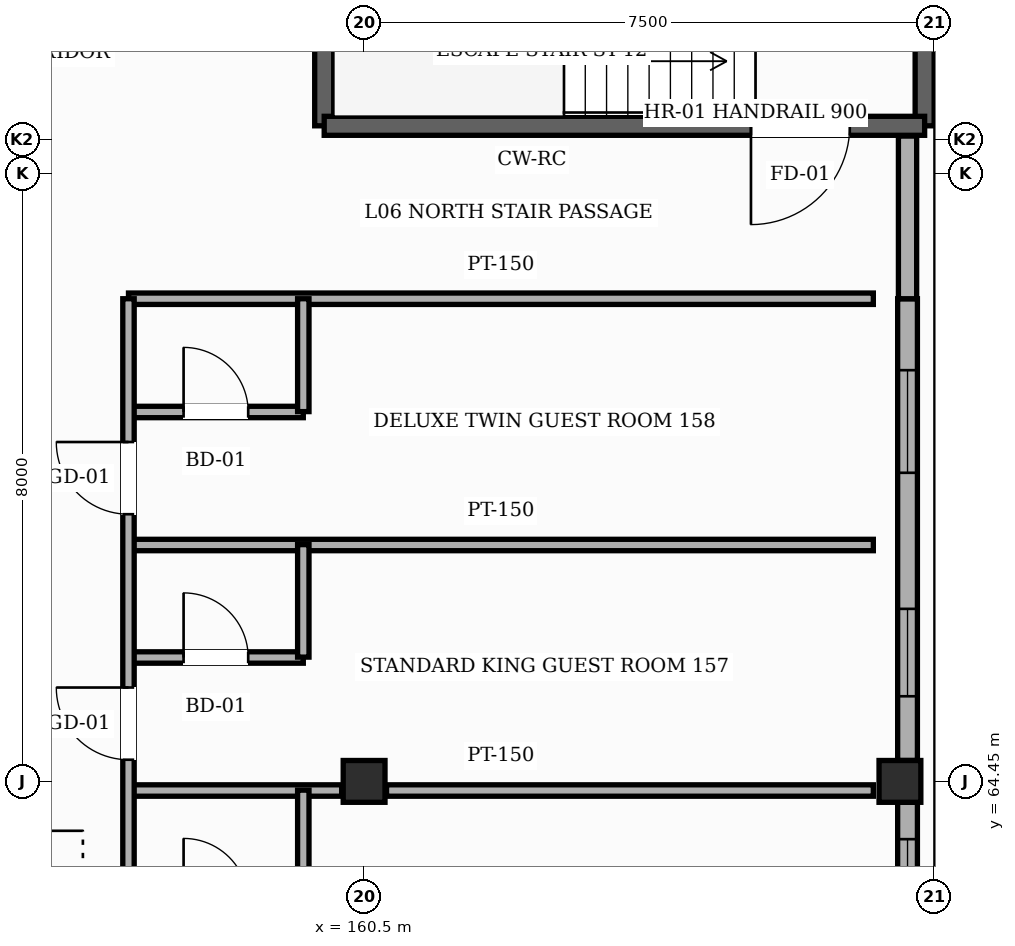
"""IFC4 building model, lengths in metres.
Left out: names, types, materials, properties, quantities, classifications, styles, units other than length and angle.
Written with IfcOpenShell. Run it as: python <this file> out.ifc"""

import sys

from ifc_helpers import new_model, si_unit, direction, frame, frame_2d, origin, origin_2d, place, context, subcontext, project, spatial, rectangle, hollow_rectangle, extrude, element, fill, save


model = new_model("IFC4")
c1 = context("Model", 3, precision=1e-05, world=origin(), true_north=direction((0.0, 1.0)))
c2 = subcontext(c1, "Body", "Model", "MODEL_VIEW")
j1 = project(units=[si_unit("LENGTHUNIT", "METRE"), si_unit("PLANEANGLEUNIT", "RADIAN")], contexts=[c1])
p1 = place(None, origin())
s1 = spatial("IfcSite", under=j1, at=p1, CompositionType="ELEMENT")
p2 = place(p1, origin())
s2 = spatial("IfcBuilding", under=s1, at=p2, CompositionType="ELEMENT")
p3 = place(p2, frame((0.0, 0.0, 28.2)))
s3 = spatial("IfcBuildingStorey", under=s2, at=p3, CompositionType="ELEMENT", Elevation=28.2)
for number, where, z_axis, x_axis in (
    (1, (160.5, 64.45, 0.0), (0.0, 0.0, 1.0), (1.0, 0.0, 0.0)),
    (2, (167.55, 64.45, 0.0), (0.0, 0.0, 1.0), (1.0, 0.0, 0.0)),
):
    element("IfcColumn", number, at=place(p3, frame(where, z_axis=z_axis, x_axis=x_axis)), inside=s3, PredefinedType="COLUMN", context=c2, shape_type="SweptSolid", body=[
        extrude(hollow_rectangle(XDim=0.55, YDim=0.55, WallThickness=0.022, InnerFilletRadius=0.022, OuterFilletRadius=0.044, at=origin_2d()), origin(), (0.0, 0.0, 1.0), 3.6),
    ])
p4 = place(p3, frame((167.65, 64.175, 0.0), z_axis=(0.0, 0.0, 1.0), x_axis=(0.0, -1.0, 0.0)))
e3 = element("IfcWall", 3, at=p4, inside=s3, PredefinedType="SOLIDWALL", context=c2, shape_type="SweptSolid", body=[
    extrude(rectangle(XDim=7.45, YDim=0.26, at=frame_2d((3.725, 0.0))), origin(), (0.0, 0.0, 1.0), 2.755),
])
p5 = place(p4, frame((3.765, 0.0, 0.85)))
e4 = element("IfcOpeningElement", 4, at=p5, cuts=e3, PredefinedType="OPENING", context=c2, shape_type="SweptSolid", body=[
    extrude(rectangle(XDim=1.85, YDim=1.65, at=frame_2d((0.925, 0.825))), frame((0.0, 0.14, 0.0), z_axis=(0.0, -1.0, 0.0), x_axis=(1.0, 0.0, 0.0)), (0.0, 0.0, 1.0), 0.28),
])
p6 = place(p4, frame((0.485, 0.0, 0.85)))
e5 = element("IfcOpeningElement", 5, at=p6, cuts=e3, PredefinedType="OPENING", context=c2, shape_type="SweptSolid", body=[
    extrude(rectangle(XDim=2.1, YDim=1.65, at=frame_2d((1.05, 0.825))), frame((0.0, 0.14, 0.0), z_axis=(0.0, -1.0, 0.0), x_axis=(1.0, 0.0, 0.0)), (0.0, 0.0, 1.0), 0.28),
])
p7 = place(p3, frame((167.65, 70.8, 0.0), z_axis=(0.0, 0.0, 1.0), x_axis=(0.0, -1.0, 0.0)))
e6 = element("IfcWall", 6, at=p7, inside=s3, PredefinedType="SOLIDWALL", context=c2, shape_type="SweptSolid", body=[
    extrude(rectangle(XDim=6.075, YDim=0.26, at=frame_2d((3.038, 0.0))), origin(), (0.0, 0.0, 1.0), 3.365),
])
p8 = place(p7, frame((4.08, 0.0, 0.85)))
e7 = element("IfcOpeningElement", 7, at=p8, cuts=e6, PredefinedType="OPENING", context=c2, shape_type="SweptSolid", body=[
    extrude(rectangle(XDim=1.15, YDim=1.8, at=frame_2d((0.575, 0.9))), frame((0.0, 0.14, 0.0), z_axis=(0.0, -1.0, 0.0), x_axis=(1.0, 0.0, 0.0)), (0.0, 0.0, 1.0), 0.28),
])
p9 = place(p7, frame((0.94, 0.0, 0.85)))
e8 = element("IfcOpeningElement", 8, at=p9, cuts=e6, PredefinedType="OPENING", context=c2, shape_type="SweptSolid", body=[
    extrude(rectangle(XDim=1.35, YDim=1.8, at=frame_2d((0.675, 0.9))), frame((0.0, 0.14, 0.0), z_axis=(0.0, -1.0, 0.0), x_axis=(1.0, 0.0, 0.0)), (0.0, 0.0, 1.0), 0.28),
])
p10 = place(p3, frame((167.65, 72.94, 0.0), z_axis=(0.0, 0.0, 1.0), x_axis=(0.0, -1.0, 0.0)))
e9 = element("IfcWall", 9, at=p10, inside=s3, PredefinedType="SOLIDWALL", context=c2, shape_type="SweptSolid", body=[
    extrude(rectangle(XDim=2.14, YDim=0.24, at=frame_2d((1.07, 0.0))), origin(), (0.0, 0.0, 1.0), 3.365),
])
for number, where, z_axis, x_axis in (
    (10, (167.875, 76.425, 0.0), (0.0, 0.0, 1.0), (0.0, -1.0, 0.0)),
    (11, (159.975, 73.075, 0.0), (0.0, 0.0, 1.0), (0.0, 1.0, 0.0)),
):
    element("IfcWall", number, at=place(p3, frame(where, z_axis=z_axis, x_axis=x_axis)), inside=s3, PredefinedType="SHEAR", context=c2, shape_type="SweptSolid", body=[
        extrude(rectangle(XDim=3.35, YDim=0.25, at=frame_2d((1.675, 0.0))), origin(), (0.0, 0.0, 1.0), 3.38),
    ])
p11 = place(p3, frame((167.875, 73.075, 0.0), z_axis=(0.0, 0.0, 1.0), x_axis=(-1.0, 0.0, 0.0)))
e12 = element("IfcWall", 12, at=p11, inside=s3, PredefinedType="SHEAR", context=c2, shape_type="SweptSolid", body=[
    extrude(rectangle(XDim=7.9, YDim=0.25, at=frame_2d((3.95, 0.0))), origin(), (0.0, 0.0, 1.0), 3.38),
])
p12 = place(p11, frame((0.985, 0.0, 0.0)))
e13 = element("IfcOpeningElement", 13, at=p12, cuts=e12, PredefinedType="OPENING", context=c2, shape_type="SweptSolid", body=[
    extrude(rectangle(XDim=1.3, YDim=2.2, at=frame_2d((0.65, 1.1))), frame((0.0, 0.135, 0.0), z_axis=(0.0, -1.0, 0.0), x_axis=(1.0, 0.0, 0.0)), (0.0, 0.0, 1.0), 0.27),
])
p13 = place(p3, frame((157.4, 64.33, 0.0), z_axis=(0.0, 0.0, 1.0), x_axis=(1.0, 0.0, 0.0)))
e14 = element("IfcWall", 14, at=p13, inside=s3, PredefinedType="PARTITIONING", context=c2, shape_type="SweptSolid", body=[
    extrude(rectangle(XDim=2.805, YDim=0.15, at=frame_2d((1.403, 0.0))), origin(), (0.0, 0.0, 1.0), 2.805),
])
p14 = place(p3, frame((160.795, 64.33, 0.0), z_axis=(0.0, 0.0, 1.0), x_axis=(1.0, 0.0, 0.0)))
e15 = element("IfcWall", 15, at=p14, inside=s3, PredefinedType="PARTITIONING", context=c2, shape_type="SweptSolid", body=[
    extrude(rectangle(XDim=6.405, YDim=0.15, at=frame_2d((3.203, 0.0))), origin(), (0.0, 0.0, 1.0), 2.855),
])
p15 = place(p3, frame((157.4, 66.08, 0.0), z_axis=(0.0, 0.0, 1.0), x_axis=(1.0, 0.0, 0.0)))
e16 = element("IfcWall", 16, at=p15, inside=s3, PredefinedType="PARTITIONING", context=c2, shape_type="SweptSolid", body=[
    extrude(rectangle(XDim=2.3, YDim=0.15, at=frame_2d((1.15, 0.0))), origin(), (0.0, 0.0, 1.0), 3.365),
])
p16 = place(p15, frame((0.725, 0.0, 0.0)))
e17 = element("IfcOpeningElement", 17, at=p16, cuts=e16, PredefinedType="OPENING", context=c2, shape_type="SweptSolid", body=[
    extrude(rectangle(XDim=0.85, YDim=2.1, at=frame_2d((0.425, 1.05))), frame((0.0, 0.085, 0.0), z_axis=(0.0, -1.0, 0.0), x_axis=(1.0, 0.0, 0.0)), (0.0, 0.0, 1.0), 0.17),
])
p17 = place(p3, frame((157.4, 67.56, 0.0), z_axis=(0.0, 0.0, 1.0), x_axis=(1.0, 0.0, 0.0)))
e18 = element("IfcWall", 18, at=p17, inside=s3, PredefinedType="PARTITIONING", context=c2, shape_type="SweptSolid", body=[
    extrude(rectangle(XDim=9.8, YDim=0.15, at=frame_2d((4.9, 0.0))), origin(), (0.0, 0.0, 1.0), 3.365),
])
p18 = place(p3, frame((157.4, 69.31, 0.0), z_axis=(0.0, 0.0, 1.0), x_axis=(1.0, 0.0, 0.0)))
e19 = element("IfcWall", 19, at=p18, inside=s3, PredefinedType="PARTITIONING", context=c2, shape_type="SweptSolid", body=[
    extrude(rectangle(XDim=2.3, YDim=0.15, at=frame_2d((1.15, 0.0))), origin(), (0.0, 0.0, 1.0), 3.365),
])
p19 = place(p18, frame((0.725, 0.0, 0.0)))
e20 = element("IfcOpeningElement", 20, at=p19, cuts=e19, PredefinedType="OPENING", context=c2, shape_type="SweptSolid", body=[
    extrude(rectangle(XDim=0.85, YDim=2.1, at=frame_2d((0.425, 1.05))), frame((0.0, 0.085, 0.0), z_axis=(0.0, -1.0, 0.0), x_axis=(1.0, 0.0, 0.0)), (0.0, 0.0, 1.0), 0.17),
])
p20 = place(p3, frame((157.4, 70.8, 0.0), z_axis=(0.0, 0.0, 1.0), x_axis=(1.0, 0.0, 0.0)))
e21 = element("IfcWall", 21, at=p20, inside=s3, PredefinedType="PARTITIONING", context=c2, shape_type="SweptSolid", body=[
    extrude(rectangle(XDim=9.8, YDim=0.15, at=frame_2d((4.9, 0.0))), origin(), (0.0, 0.0, 1.0), 3.365),
])
p21 = place(p3, frame((157.4, 22.3, 0.0), z_axis=(0.0, 0.0, 1.0), x_axis=(0.0, 1.0, 0.0)))
e22 = element("IfcWall", 22, at=p21, inside=s3, PredefinedType="PARTITIONING", context=c2, shape_type="SweptSolid", body=[
    extrude(rectangle(XDim=48.5, YDim=0.15, at=frame_2d((24.25, 0.0))), origin(), (0.0, 0.0, 1.0), 3.365),
])
p22 = place(p21, frame((0.325, 0.0, 0.0)))
e23 = element("IfcOpeningElement", 23, at=p22, cuts=e22, PredefinedType="OPENING", context=c2, shape_type="SweptSolid", body=[
    extrude(rectangle(XDim=1.1, YDim=2.2, at=frame_2d((0.55, 1.1))), frame((0.0, 0.085, 0.0), z_axis=(0.0, -1.0, 0.0), x_axis=(1.0, 0.0, 0.0)), (0.0, 0.0, 1.0), 0.17),
])
p23 = place(p21, frame((3.635, 0.0, 0.0)))
e24 = element("IfcOpeningElement", 24, at=p23, cuts=e22, PredefinedType="OPENING", context=c2, shape_type="SweptSolid", body=[
    extrude(rectangle(XDim=0.95, YDim=2.15, at=frame_2d((0.475, 1.075))), frame((0.0, 0.085, 0.0), z_axis=(0.0, -1.0, 0.0), x_axis=(1.0, 0.0, 0.0)), (0.0, 0.0, 1.0), 0.17),
])
p24 = place(p21, frame((6.865, 0.0, 0.0)))
e25 = element("IfcOpeningElement", 25, at=p24, cuts=e22, PredefinedType="OPENING", context=c2, shape_type="SweptSolid", body=[
    extrude(rectangle(XDim=0.95, YDim=2.15, at=frame_2d((0.475, 1.075))), frame((0.0, 0.085, 0.0), z_axis=(0.0, -1.0, 0.0), x_axis=(1.0, 0.0, 0.0)), (0.0, 0.0, 1.0), 0.17),
])
p25 = place(p21, frame((10.1, 0.0, 0.0)))
e26 = element("IfcOpeningElement", 26, at=p25, cuts=e22, PredefinedType="OPENING", context=c2, shape_type="SweptSolid", body=[
    extrude(rectangle(XDim=0.95, YDim=2.15, at=frame_2d((0.475, 1.075))), frame((0.0, 0.085, 0.0), z_axis=(0.0, -1.0, 0.0), x_axis=(1.0, 0.0, 0.0)), (0.0, 0.0, 1.0), 0.17),
])
p26 = place(p21, frame((13.335, 0.0, 0.0)))
e27 = element("IfcOpeningElement", 27, at=p26, cuts=e22, PredefinedType="OPENING", context=c2, shape_type="SweptSolid", body=[
    extrude(rectangle(XDim=0.95, YDim=2.15, at=frame_2d((0.475, 1.075))), frame((0.0, 0.085, 0.0), z_axis=(0.0, -1.0, 0.0), x_axis=(1.0, 0.0, 0.0)), (0.0, 0.0, 1.0), 0.17),
])
p27 = place(p21, frame((16.565, 0.0, 0.0)))
e28 = element("IfcOpeningElement", 28, at=p27, cuts=e22, PredefinedType="OPENING", context=c2, shape_type="SweptSolid", body=[
    extrude(rectangle(XDim=0.95, YDim=2.15, at=frame_2d((0.475, 1.075))), frame((0.0, 0.085, 0.0), z_axis=(0.0, -1.0, 0.0), x_axis=(1.0, 0.0, 0.0)), (0.0, 0.0, 1.0), 0.17),
])
p28 = place(p21, frame((19.8, 0.0, 0.0)))
e29 = element("IfcOpeningElement", 29, at=p28, cuts=e22, PredefinedType="OPENING", context=c2, shape_type="SweptSolid", body=[
    extrude(rectangle(XDim=0.95, YDim=2.15, at=frame_2d((0.475, 1.075))), frame((0.0, 0.085, 0.0), z_axis=(0.0, -1.0, 0.0), x_axis=(1.0, 0.0, 0.0)), (0.0, 0.0, 1.0), 0.17),
])
p29 = place(p21, frame((23.035, 0.0, 0.0)))
e30 = element("IfcOpeningElement", 30, at=p29, cuts=e22, PredefinedType="OPENING", context=c2, shape_type="SweptSolid", body=[
    extrude(rectangle(XDim=0.95, YDim=2.15, at=frame_2d((0.475, 1.075))), frame((0.0, 0.085, 0.0), z_axis=(0.0, -1.0, 0.0), x_axis=(1.0, 0.0, 0.0)), (0.0, 0.0, 1.0), 0.17),
])
p30 = place(p21, frame((26.265, 0.0, 0.0)))
e31 = element("IfcOpeningElement", 31, at=p30, cuts=e22, PredefinedType="OPENING", context=c2, shape_type="SweptSolid", body=[
    extrude(rectangle(XDim=0.95, YDim=2.15, at=frame_2d((0.475, 1.075))), frame((0.0, 0.085, 0.0), z_axis=(0.0, -1.0, 0.0), x_axis=(1.0, 0.0, 0.0)), (0.0, 0.0, 1.0), 0.17),
])
p31 = place(p21, frame((29.5, 0.0, 0.0)))
e32 = element("IfcOpeningElement", 32, at=p31, cuts=e22, PredefinedType="OPENING", context=c2, shape_type="SweptSolid", body=[
    extrude(rectangle(XDim=0.95, YDim=2.15, at=frame_2d((0.475, 1.075))), frame((0.0, 0.085, 0.0), z_axis=(0.0, -1.0, 0.0), x_axis=(1.0, 0.0, 0.0)), (0.0, 0.0, 1.0), 0.17),
])
p32 = place(p21, frame((32.735, 0.0, 0.0)))
e33 = element("IfcOpeningElement", 33, at=p32, cuts=e22, PredefinedType="OPENING", context=c2, shape_type="SweptSolid", body=[
    extrude(rectangle(XDim=0.95, YDim=2.15, at=frame_2d((0.475, 1.075))), frame((0.0, 0.085, 0.0), z_axis=(0.0, -1.0, 0.0), x_axis=(1.0, 0.0, 0.0)), (0.0, 0.0, 1.0), 0.17),
])
p33 = place(p21, frame((35.965, 0.0, 0.0)))
e34 = element("IfcOpeningElement", 34, at=p33, cuts=e22, PredefinedType="OPENING", context=c2, shape_type="SweptSolid", body=[
    extrude(rectangle(XDim=0.95, YDim=2.15, at=frame_2d((0.475, 1.075))), frame((0.0, 0.085, 0.0), z_axis=(0.0, -1.0, 0.0), x_axis=(1.0, 0.0, 0.0)), (0.0, 0.0, 1.0), 0.17),
])
p34 = place(p21, frame((39.2, 0.0, 0.0)))
e35 = element("IfcOpeningElement", 35, at=p34, cuts=e22, PredefinedType="OPENING", context=c2, shape_type="SweptSolid", body=[
    extrude(rectangle(XDim=0.95, YDim=2.15, at=frame_2d((0.475, 1.075))), frame((0.0, 0.085, 0.0), z_axis=(0.0, -1.0, 0.0), x_axis=(1.0, 0.0, 0.0)), (0.0, 0.0, 1.0), 0.17),
])
p35 = place(p21, frame((42.435, 0.0, 0.0)))
e36 = element("IfcOpeningElement", 36, at=p35, cuts=e22, PredefinedType="OPENING", context=c2, shape_type="SweptSolid", body=[
    extrude(rectangle(XDim=0.95, YDim=2.15, at=frame_2d((0.475, 1.075))), frame((0.0, 0.085, 0.0), z_axis=(0.0, -1.0, 0.0), x_axis=(1.0, 0.0, 0.0)), (0.0, 0.0, 1.0), 0.17),
])
p36 = place(p21, frame((45.665, 0.0, 0.0)))
e37 = element("IfcOpeningElement", 37, at=p36, cuts=e22, PredefinedType="OPENING", context=c2, shape_type="SweptSolid", body=[
    extrude(rectangle(XDim=0.95, YDim=2.15, at=frame_2d((0.475, 1.075))), frame((0.0, 0.085, 0.0), z_axis=(0.0, -1.0, 0.0), x_axis=(1.0, 0.0, 0.0)), (0.0, 0.0, 1.0), 0.17),
])
p37 = place(p3, frame((159.7, 62.85, 0.0), z_axis=(0.0, 0.0, 1.0), x_axis=(0.0, 1.0, 0.0)))
e38 = element("IfcWall", 38, at=p37, inside=s3, PredefinedType="PARTITIONING", context=c2, shape_type="SweptSolid", body=[
    extrude(rectangle(XDim=1.485, YDim=0.15, at=frame_2d((0.742, 0.0))), origin(), (0.0, 0.0, 1.0), 3.365),
])
p38 = place(p3, frame((159.7, 66.085, 0.0), z_axis=(0.0, 0.0, 1.0), x_axis=(0.0, 1.0, 0.0)))
e39 = element("IfcWall", 39, at=p38, inside=s3, PredefinedType="PARTITIONING", context=c2, shape_type="SweptSolid", body=[
    extrude(rectangle(XDim=1.48, YDim=0.15, at=frame_2d((0.74, 0.0))), origin(), (0.0, 0.0, 1.0), 3.365),
])
p39 = place(p3, frame((159.7, 69.315, 0.0), z_axis=(0.0, 0.0, 1.0), x_axis=(0.0, 1.0, 0.0)))
e40 = element("IfcWall", 40, at=p39, inside=s3, PredefinedType="PARTITIONING", context=c2, shape_type="SweptSolid", body=[
    extrude(rectangle(XDim=1.485, YDim=0.15, at=frame_2d((0.743, 0.0))), origin(), (0.0, 0.0, 1.0), 3.365),
])
p40 = place(p6, origin())
e41 = element("IfcWindow", 41, at=p40, inside=s3, PartitioningType="SINGLE_PANEL", PredefinedType="WINDOW", context=c2, shape_type="SweptSolid", body=[
    extrude(rectangle(XDim=2.1, YDim=1.65, at=frame_2d((1.05, 0.825))), frame((0.0, 0.03, 0.0), z_axis=(0.0, -1.0, 0.0), x_axis=(1.0, 0.0, 0.0)), (0.0, 0.0, 1.0), 0.06),
])
fill(e5, e41)
p41 = place(p8, origin())
e42 = element("IfcWindow", 42, at=p41, inside=s3, PartitioningType="SINGLE_PANEL", PredefinedType="WINDOW", context=c2, shape_type="SweptSolid", body=[
    extrude(rectangle(XDim=1.15, YDim=1.8, at=frame_2d((0.575, 0.9))), frame((0.0, 0.03, 0.0), z_axis=(0.0, -1.0, 0.0), x_axis=(1.0, 0.0, 0.0)), (0.0, 0.0, 1.0), 0.06),
])
fill(e7, e42)
p42 = place(p9, origin())
e43 = element("IfcWindow", 43, at=p42, inside=s3, PartitioningType="SINGLE_PANEL", PredefinedType="WINDOW", context=c2, shape_type="SweptSolid", body=[
    extrude(rectangle(XDim=1.35, YDim=1.8, at=frame_2d((0.675, 0.9))), frame((0.0, 0.03, 0.0), z_axis=(0.0, -1.0, 0.0), x_axis=(1.0, 0.0, 0.0)), (0.0, 0.0, 1.0), 0.06),
])
fill(e8, e43)
p43 = place(p12, origin())
e44 = element("IfcDoor", 44, at=p43, inside=s3, OperationType="SINGLE_SWING_RIGHT", PredefinedType="DOOR", context=c2, shape_type="SweptSolid", body=[
    extrude(rectangle(XDim=1.3, YDim=2.2, at=frame_2d((0.65, 1.1))), frame((0.0, 0.025, 0.0), z_axis=(0.0, -1.0, 0.0), x_axis=(1.0, 0.0, 0.0)), (0.0, 0.0, 1.0), 0.05),
])
fill(e13, e44)
p44 = place(p35, origin())
e45 = element("IfcDoor", 45, at=p44, inside=s3, OperationType="SINGLE_SWING_RIGHT", PredefinedType="DOOR", context=c2, shape_type="SweptSolid", body=[
    extrude(rectangle(XDim=0.95, YDim=2.15, at=frame_2d((0.475, 1.075))), frame((0.0, 0.025, 0.0), z_axis=(0.0, -1.0, 0.0), x_axis=(1.0, 0.0, 0.0)), (0.0, 0.0, 1.0), 0.05),
])
fill(e36, e45)
p45 = place(p16, origin())
e46 = element("IfcDoor", 46, at=p45, inside=s3, OperationType="SINGLE_SWING_LEFT", PredefinedType="DOOR", context=c2, shape_type="SweptSolid", body=[
    extrude(rectangle(XDim=0.85, YDim=2.1, at=frame_2d((0.425, 1.05))), frame((0.0, 0.025, 0.0), z_axis=(0.0, -1.0, 0.0), x_axis=(1.0, 0.0, 0.0)), (0.0, 0.0, 1.0), 0.05),
])
fill(e17, e46)
p46 = place(p36, origin())
e47 = element("IfcDoor", 47, at=p46, inside=s3, OperationType="SINGLE_SWING_RIGHT", PredefinedType="DOOR", context=c2, shape_type="SweptSolid", body=[
    extrude(rectangle(XDim=0.95, YDim=2.15, at=frame_2d((0.475, 1.075))), frame((0.0, 0.025, 0.0), z_axis=(0.0, -1.0, 0.0), x_axis=(1.0, 0.0, 0.0)), (0.0, 0.0, 1.0), 0.05),
])
fill(e37, e47)
p47 = place(p19, origin())
e48 = element("IfcDoor", 48, at=p47, inside=s3, OperationType="SINGLE_SWING_LEFT", PredefinedType="DOOR", context=c2, shape_type="SweptSolid", body=[
    extrude(rectangle(XDim=0.85, YDim=2.1, at=frame_2d((0.425, 1.05))), frame((0.0, 0.025, 0.0), z_axis=(0.0, -1.0, 0.0), x_axis=(1.0, 0.0, 0.0)), (0.0, 0.0, 1.0), 0.05),
])
fill(e20, e48)
save(model, sys.argv[1])
